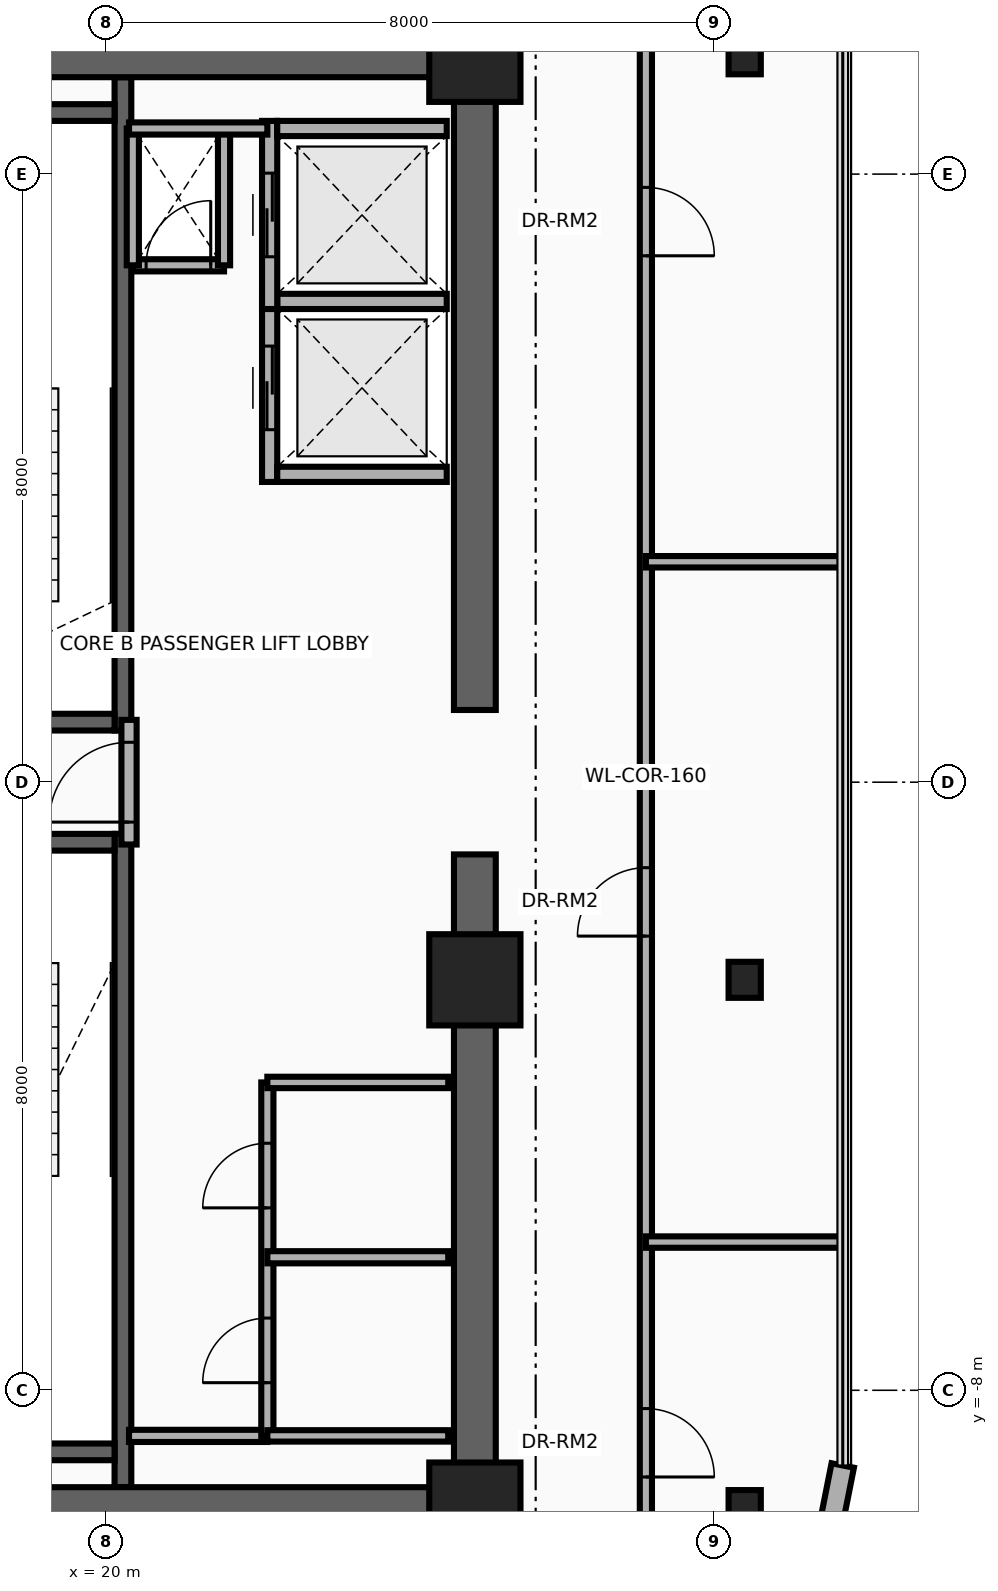
"""IFC4 building model, lengths in metres.
Left out: names, types, materials, properties, quantities, classifications, styles, units other than length and angle.
Written with IfcOpenShell. Run it as: python <this file> out.ifc"""

import sys

from ifc_helpers import new_model, si_unit, direction, frame, frame_2d, origin, origin_2d, place, context, subcontext, project, spatial, rectangle, i_section, extrude, source, transform, mapped, element, fill, save


model = new_model("IFC4")
c1 = context("Model", 3, precision=1e-05, world=origin(), true_north=direction((0.0, 1.0)))
c2 = subcontext(c1, "Body", "Model", "MODEL_VIEW")
j1 = project(units=[si_unit("LENGTHUNIT", "METRE"), si_unit("PLANEANGLEUNIT", "RADIAN")], contexts=[c1])
p1 = place(None, origin())
s1 = spatial("IfcSite", under=j1, at=p1, CompositionType="ELEMENT")
p2 = place(p1, origin())
s2 = spatial("IfcBuilding", under=s1, at=p2, CompositionType="ELEMENT")
p3 = place(p2, frame((0.0, 0.0, 168.6)))
s3 = spatial("IfcBuildingStorey", under=s2, at=p3, CompositionType="ELEMENT", Elevation=168.6)
p4 = place(p3, frame((20.22, 0.68, 0.0), z_axis=(0.0, 0.0, 1.0), x_axis=(0.0, 1.0, 0.0)))
e1 = element("IfcWall", 1, at=p4, inside=s3, PredefinedType="SHEAR", context=c2, shape_type="SweptSolid", body=[
    extrude(rectangle(XDim=8.595, YDim=0.22, at=frame_2d((4.297, 0.0))), origin(), (0.0, 0.0, 1.0), 3.3),
])
p5 = place(p3, frame((17.0, 0.79, 0.0), z_axis=(0.0, 0.0, 1.0), x_axis=(1.0, 0.0, 0.0)))
e2 = element("IfcWall", 2, at=p5, inside=s3, PredefinedType="SHEAR", context=c2, shape_type="SweptSolid", body=[
    extrude(rectangle(XDim=3.11, YDim=0.22, at=frame_2d((1.555, 0.0))), origin(), (0.0, 0.0, 1.0), 3.3),
])
p6 = place(p5, frame((0.95, 0.0, 0.0)))
e3 = element("IfcOpeningElement", 3, at=p6, cuts=e2, PredefinedType="OPENING", context=c2, shape_type="SweptSolid", body=[
    extrude(rectangle(XDim=1.1, YDim=2.15, at=frame_2d((0.55, 1.075))), frame((0.0, 0.125, 0.0), z_axis=(0.0, -1.0, 0.0), x_axis=(1.0, 0.0, 0.0)), (0.0, 0.0, 1.0), 0.25),
])
p7 = place(p3, frame((17.0, 8.81, 0.0), z_axis=(0.0, 0.0, 1.0), x_axis=(1.0, 0.0, 0.0)))
e4 = element("IfcWall", 4, at=p7, inside=s3, PredefinedType="SHEAR", context=c2, shape_type="SweptSolid", body=[
    extrude(rectangle(XDim=3.11, YDim=0.22, at=frame_2d((1.555, 0.0))), origin(), (0.0, 0.0, 1.0), 3.3),
])
p8 = place(p3, frame((20.22, -9.275, 0.0), z_axis=(0.0, 0.0, 1.0), x_axis=(0.0, 1.0, 0.0)))
e5 = element("IfcWall", 5, at=p8, inside=s3, PredefinedType="SHEAR", context=c2, shape_type="SweptSolid", body=[
    extrude(rectangle(XDim=8.595, YDim=0.22, at=frame_2d((4.297, 0.0))), origin(), (0.0, 0.0, 1.0), 3.3),
])
p9 = place(p3, frame((17.0, -8.81, 0.0), z_axis=(0.0, 0.0, 1.0), x_axis=(1.0, 0.0, 0.0)))
e6 = element("IfcWall", 6, at=p9, inside=s3, PredefinedType="SHEAR", context=c2, shape_type="SweptSolid", body=[
    extrude(rectangle(XDim=3.11, YDim=0.22, at=frame_2d((1.555, 0.0))), origin(), (0.0, 0.0, 1.0), 3.3),
])
p10 = place(p3, frame((17.0, -0.79, 0.0), z_axis=(0.0, 0.0, 1.0), x_axis=(1.0, 0.0, 0.0)))
e7 = element("IfcWall", 7, at=p10, inside=s3, PredefinedType="SHEAR", context=c2, shape_type="SweptSolid", body=[
    extrude(rectangle(XDim=3.11, YDim=0.22, at=frame_2d((1.555, 0.0))), origin(), (0.0, 0.0, 1.0), 3.3),
])
p11 = place(p10, frame((0.95, 0.0, 0.0)))
e8 = element("IfcOpeningElement", 8, at=p11, cuts=e7, PredefinedType="OPENING", context=c2, shape_type="SweptSolid", body=[
    extrude(rectangle(XDim=1.1, YDim=2.15, at=frame_2d((0.55, 1.075))), frame((0.0, 0.125, 0.0), z_axis=(0.0, -1.0, 0.0), x_axis=(1.0, 0.0, 0.0)), (0.0, 0.0, 1.0), 0.25),
])
for number, where, z_axis, x_axis in (
    (9, (24.85, -9.825, 0.0), (0.0, 0.0, 1.0), (0.0, 1.0, 0.0)),
    (10, (24.85, 0.95, 0.0), (0.0, 0.0, 1.0), (0.0, 1.0, 0.0)),
):
    element("IfcWall", number, at=place(p3, frame(where, z_axis=z_axis, x_axis=x_axis)), inside=s3, PredefinedType="SHEAR", context=c2, shape_type="SweptSolid", body=[
        extrude(rectangle(XDim=8.875, YDim=0.55, at=frame_2d((4.438, 0.0))), origin(), (0.0, 0.0, 1.0), 3.3),
    ])
for number, where, z_axis, x_axis in (
    (11, (15.85, 9.55, 0.0), (0.0, 0.0, 1.0), (1.0, 0.0, 0.0)),
    (12, (15.85, -9.55, 0.0), (0.0, 0.0, 1.0), (1.0, 0.0, 0.0)),
):
    element("IfcWall", number, at=place(p3, frame(where, z_axis=z_axis, x_axis=x_axis)), inside=s3, PredefinedType="SHEAR", context=c2, shape_type="SweptSolid", body=[
        extrude(rectangle(XDim=9.0, YDim=0.55, at=frame_2d((4.5, 0.0))), origin(), (0.0, 0.0, 1.0), 3.3),
    ])
m1 = source(origin(), c2, "Body", "SweptSolid", [
    extrude(rectangle(XDim=1.2, YDim=1.2, at=origin_2d()), origin(), (0.0, 0.0, 1.0), 3.7),
])
p12 = place(p3, frame((24.85, -9.55, 0.0), z_axis=(0.0, 0.0, 1.0), x_axis=(1.0, 0.0, 0.0)))
e13 = element("IfcColumn", 13, at=p12, inside=s3, PredefinedType="COLUMN", context=c2, shape_type="MappedRepresentation", body=[
    mapped(m1, transform((0.0, 0.0, 0.0), x_axis=(1.0, 0.0, 0.0), y_axis=(0.0, 1.0, 0.0), z_axis=(0.0, 0.0, 1.0), scale=1.0)),
])
m2 = source(origin(), c2, "Body", "SweptSolid", [
    extrude(i_section(OverallWidth=0.424, OverallDepth=0.474, WebThickness=0.048, FlangeThickness=0.077, at=origin_2d()), origin(), (0.0, 0.0, 1.0), 3.7),
])
p13 = place(p3, frame((28.4, -9.55, 0.0), z_axis=(0.0, 0.0, 1.0), x_axis=(1.0, 0.0, 0.0)))
e14 = element("IfcColumn", 14, at=p13, inside=s3, PredefinedType="COLUMN", context=c2, shape_type="MappedRepresentation", body=[
    mapped(m2, transform((0.0, 0.0, 0.0), x_axis=(1.0, 0.0, 0.0), y_axis=(0.0, 1.0, 0.0), z_axis=(0.0, 0.0, 1.0), scale=1.0)),
])
p14 = place(p3, frame((24.85, -2.6, 0.0), z_axis=(0.0, 0.0, 1.0), x_axis=(1.0, 0.0, 0.0)))
e15 = element("IfcColumn", 15, at=p14, inside=s3, PredefinedType="COLUMN", context=c2, shape_type="MappedRepresentation", body=[
    mapped(m1, transform((0.0, 0.0, 0.0), x_axis=(1.0, 0.0, 0.0), y_axis=(0.0, 1.0, 0.0), z_axis=(0.0, 0.0, 1.0), scale=1.0)),
])
p15 = place(p3, frame((28.4, -2.6, 0.0), z_axis=(0.0, 0.0, 1.0), x_axis=(1.0, 0.0, 0.0)))
e16 = element("IfcColumn", 16, at=p15, inside=s3, PredefinedType="COLUMN", context=c2, shape_type="MappedRepresentation", body=[
    mapped(m2, transform((0.0, 0.0, 0.0), x_axis=(1.0, 0.0, 0.0), y_axis=(0.0, 1.0, 0.0), z_axis=(0.0, 0.0, 1.0), scale=1.0)),
])
p16 = place(p3, frame((24.85, 9.55, 0.0), z_axis=(0.0, 0.0, 1.0), x_axis=(1.0, 0.0, 0.0)))
e17 = element("IfcColumn", 17, at=p16, inside=s3, PredefinedType="COLUMN", context=c2, shape_type="MappedRepresentation", body=[
    mapped(m1, transform((0.0, 0.0, 0.0), x_axis=(1.0, 0.0, 0.0), y_axis=(0.0, 1.0, 0.0), z_axis=(0.0, 0.0, 1.0), scale=1.0)),
])
p17 = place(p3, frame((28.4, 9.55, 0.0), z_axis=(0.0, 0.0, 1.0), x_axis=(1.0, 0.0, 0.0)))
e18 = element("IfcColumn", 18, at=p17, inside=s3, PredefinedType="COLUMN", context=c2, shape_type="MappedRepresentation", body=[
    mapped(m2, transform((0.0, 0.0, 0.0), x_axis=(1.0, 0.0, 0.0), y_axis=(0.0, 1.0, 0.0), z_axis=(0.0, 0.0, 1.0), scale=1.0)),
])
p18 = place(p3, frame((29.69, -8.989, 0.0), z_axis=(0.0, 0.0, 1.0), x_axis=(-0.195043173023, -0.980794657743, 0.0)))
e19 = element("IfcWall", 19, at=p18, inside=s3, PredefinedType="SOLIDWALL", context=c2, shape_type="SweptSolid", body=[
    extrude(rectangle(XDim=1.138, YDim=0.3, at=frame_2d((0.569, 0.0))), origin(), (0.0, 0.0, 1.0), 3.3),
])
p19 = place(p3, frame((22.15, 3.95, 0.0), z_axis=(0.0, 0.0, 1.0), x_axis=(0.0, 1.0, 0.0)))
e20 = element("IfcWall", 20, at=p19, inside=s3, PredefinedType="MOVABLE", context=c2, shape_type="SweptSolid", body=[
    extrude(rectangle(XDim=2.475, YDim=0.2, at=frame_2d((1.238, 0.0))), origin(), (0.0, 0.0, 1.0), 3.3),
])
p20 = place(p19, frame((0.688, 0.0, 0.0)))
e21 = element("IfcOpeningElement", 21, at=p20, cuts=e20, PredefinedType="OPENING", context=c2, shape_type="SweptSolid", body=[
    extrude(rectangle(XDim=1.1, YDim=2.1, at=frame_2d((0.55, 1.05))), frame((0.0, 0.115, 0.0), z_axis=(0.0, -1.0, 0.0), x_axis=(1.0, 0.0, 0.0)), (0.0, 0.0, 1.0), 0.23),
])
for number, where, z_axis, x_axis in (
    (22, (22.25, 4.05, 0.0), (0.0, 0.0, 1.0), (1.0, 0.0, 0.0)),
    (23, (22.25, 6.325, 0.0), (0.0, 0.0, 1.0), (1.0, 0.0, 0.0)),
):
    element("IfcWall", number, at=place(p3, frame(where, z_axis=z_axis, x_axis=x_axis)), inside=s3, PredefinedType="MOVABLE", context=c2, shape_type="SweptSolid", body=[
        extrude(rectangle(XDim=2.23, YDim=0.2, at=frame_2d((1.115, 0.0))), origin(), (0.0, 0.0, 1.0), 3.3),
    ])
p21 = place(p3, frame((22.15, 6.225, 0.0), z_axis=(0.0, 0.0, 1.0), x_axis=(0.0, 1.0, 0.0)))
e24 = element("IfcWall", 24, at=p21, inside=s3, PredefinedType="MOVABLE", context=c2, shape_type="SweptSolid", body=[
    extrude(rectangle(XDim=2.475, YDim=0.2, at=frame_2d((1.237, 0.0))), origin(), (0.0, 0.0, 1.0), 3.3),
])
p22 = place(p21, frame((0.688, 0.0, 0.0)))
e25 = element("IfcOpeningElement", 25, at=p22, cuts=e24, PredefinedType="OPENING", context=c2, shape_type="SweptSolid", body=[
    extrude(rectangle(XDim=1.1, YDim=2.1, at=frame_2d((0.55, 1.05))), frame((0.0, 0.115, 0.0), z_axis=(0.0, -1.0, 0.0), x_axis=(1.0, 0.0, 0.0)), (0.0, 0.0, 1.0), 0.23),
])
p23 = place(p3, frame((22.25, 8.6, 0.0), z_axis=(0.0, 0.0, 1.0), x_axis=(1.0, 0.0, 0.0)))
e26 = element("IfcWall", 26, at=p23, inside=s3, PredefinedType="MOVABLE", context=c2, shape_type="SweptSolid", body=[
    extrude(rectangle(XDim=2.23, YDim=0.2, at=frame_2d((1.115, 0.0))), origin(), (0.0, 0.0, 1.0), 3.3),
])
p24 = place(p3, frame((20.3, -0.82, 0.0), z_axis=(0.0, 0.0, 1.0), x_axis=(0.0, 1.0, 0.0)))
e27 = element("IfcWall", 27, at=p24, inside=s3, PredefinedType="PARTITIONING", context=c2, shape_type="SweptSolid", body=[
    extrude(rectangle(XDim=1.64, YDim=0.2, at=frame_2d((0.82, 0.0))), origin(), (0.0, 0.0, 1.0), 3.3),
])
p25 = place(p24, frame((0.295, 0.0, 0.0)))
e28 = element("IfcOpeningElement", 28, at=p25, cuts=e27, PredefinedType="OPENING", context=c2, shape_type="SweptSolid", body=[
    extrude(rectangle(XDim=1.05, YDim=2.15, at=frame_2d((0.525, 1.075))), frame((0.0, 0.115, 0.0), z_axis=(0.0, -1.0, 0.0), x_axis=(1.0, 0.0, 0.0)), (0.0, 0.0, 1.0), 0.23),
])
p26 = place(p3, frame((20.35, 6.8, 0.0), z_axis=(0.0, 0.0, 1.0), x_axis=(1.0, 0.0, 0.0)))
e29 = element("IfcWall", 29, at=p26, inside=s3, PredefinedType="PARTITIONING", context=c2, shape_type="SweptSolid", body=[
    extrude(rectangle(XDim=1.2, YDim=0.16, at=frame_2d((0.6, 0.0))), origin(), (0.0, 0.0, 1.0), 3.3),
])
p27 = place(p26, frame((0.175, 0.0, 0.0)))
e30 = element("IfcOpeningElement", 30, at=p27, cuts=e29, PredefinedType="OPENING", context=c2, shape_type="SweptSolid", body=[
    extrude(rectangle(XDim=0.85, YDim=2.05, at=frame_2d((0.425, 1.025))), frame((0.0, 0.095, 0.0), z_axis=(0.0, -1.0, 0.0), x_axis=(1.0, 0.0, 0.0)), (0.0, 0.0, 1.0), 0.19),
])
for number, where, z_axis, x_axis in (
    (31, (21.55, 6.8, 0.0), (0.0, 0.0, 1.0), (0.0, 1.0, 0.0)),
    (32, (20.35, 6.8, 0.0), (0.0, 0.0, 1.0), (0.0, 1.0, 0.0)),
):
    element("IfcWall", number, at=place(p3, frame(where, z_axis=z_axis, x_axis=x_axis)), inside=s3, PredefinedType="PARTITIONING", context=c2, shape_type="SweptSolid", body=[
        extrude(rectangle(XDim=1.8, YDim=0.16, at=frame_2d((0.9, 0.0))), origin(), (0.0, 0.0, 1.0), 3.3),
    ])
for number, where, z_axis, x_axis in (
    (33, (20.3, -8.6, 0.0), (0.0, 0.0, 1.0), (1.0, 0.0, 0.0)),
    (34, (20.3, 8.6, 0.0), (0.0, 0.0, 1.0), (1.0, 0.0, 0.0)),
):
    element("IfcWall", number, at=place(p3, frame(where, z_axis=z_axis, x_axis=x_axis)), inside=s3, PredefinedType="PARTITIONING", context=c2, shape_type="SweptSolid", body=[
        extrude(rectangle(XDim=1.82, YDim=0.16, at=frame_2d((0.91, 0.0))), origin(), (0.0, 0.0, 1.0), 3.3),
    ])
p28 = place(p3, frame((22.12, -8.6, 0.0), z_axis=(0.0, 0.0, 1.0), x_axis=(0.0, 1.0, 0.0)))
e35 = element("IfcWall", 35, at=p28, inside=s3, PredefinedType="PARTITIONING", context=c2, shape_type="SweptSolid", body=[
    extrude(rectangle(XDim=4.65, YDim=0.16, at=frame_2d((2.325, 0.0))), origin(), (0.0, 0.0, 1.0), 3.3),
])
p29 = place(p28, frame((0.7, 0.0, 0.0)))
e36 = element("IfcOpeningElement", 36, at=p29, cuts=e35, PredefinedType="OPENING", context=c2, shape_type="SweptSolid", body=[
    extrude(rectangle(XDim=0.85, YDim=2.05, at=frame_2d((0.425, 1.025))), frame((0.0, 0.095, 0.0), z_axis=(0.0, -1.0, 0.0), x_axis=(1.0, 0.0, 0.0)), (0.0, 0.0, 1.0), 0.19),
])
p30 = place(p28, frame((3.0, 0.0, 0.0)))
e37 = element("IfcOpeningElement", 37, at=p30, cuts=e35, PredefinedType="OPENING", context=c2, shape_type="SweptSolid", body=[
    extrude(rectangle(XDim=0.85, YDim=2.05, at=frame_2d((0.425, 1.025))), frame((0.0, 0.095, 0.0), z_axis=(0.0, -1.0, 0.0), x_axis=(1.0, 0.0, 0.0)), (0.0, 0.0, 1.0), 0.19),
])
for number, where, z_axis, x_axis in (
    (38, (22.12, -3.95, 0.0), (0.0, 0.0, 1.0), (1.0, 0.0, 0.0)),
    (39, (22.12, -8.6, 0.0), (0.0, 0.0, 1.0), (1.0, 0.0, 0.0)),
):
    element("IfcWall", number, at=place(p3, frame(where, z_axis=z_axis, x_axis=x_axis)), inside=s3, PredefinedType="PARTITIONING", context=c2, shape_type="SweptSolid", body=[
        extrude(rectangle(XDim=2.38, YDim=0.15, at=frame_2d((1.19, 0.0))), origin(), (0.0, 0.0, 1.0), 3.3),
    ])
p31 = place(p3, frame((22.12, -6.25, 0.0), z_axis=(0.0, 0.0, 1.0), x_axis=(1.0, 0.0, 0.0)))
e40 = element("IfcWall", 40, at=p31, inside=s3, PredefinedType="PARTITIONING", context=c2, shape_type="SweptSolid", body=[
    extrude(rectangle(XDim=2.38, YDim=0.16, at=frame_2d((1.19, 0.0))), origin(), (0.0, 0.0, 1.0), 3.3),
])
p32 = place(p3, frame((27.1, -11.701, 0.0), z_axis=(0.0, 0.0, 1.0), x_axis=(0.0, 1.0, 0.0)))
e41 = element("IfcWall", 41, at=p32, inside=s3, PredefinedType="PARTITIONING", context=c2, shape_type="SweptSolid", body=[
    extrude(rectangle(XDim=23.551, YDim=0.16, at=frame_2d((11.775, 0.0))), origin(), (0.0, 0.0, 1.0), 2.085),
])
p33 = place(p32, frame((2.56, 0.0, 0.0)))
e42 = element("IfcOpeningElement", 42, at=p33, cuts=e41, PredefinedType="OPENING", context=c2, shape_type="SweptSolid", body=[
    extrude(rectangle(XDim=0.9, YDim=2.04, at=frame_2d((0.45, 1.02))), frame((0.0, 0.095, 0.0), z_axis=(0.0, -1.0, 0.0), x_axis=(1.0, 0.0, 0.0)), (0.0, 0.0, 1.0), 0.19),
])
p34 = place(p32, frame((9.676, 0.0, 0.0)))
e43 = element("IfcOpeningElement", 43, at=p34, cuts=e41, PredefinedType="OPENING", context=c2, shape_type="SweptSolid", body=[
    extrude(rectangle(XDim=0.9, YDim=2.04, at=frame_2d((0.45, 1.02))), frame((0.0, 0.095, 0.0), z_axis=(0.0, -1.0, 0.0), x_axis=(1.0, 0.0, 0.0)), (0.0, 0.0, 1.0), 0.19),
])
p35 = place(p32, frame((18.626, 0.0, 0.0)))
e44 = element("IfcOpeningElement", 44, at=p35, cuts=e41, PredefinedType="OPENING", context=c2, shape_type="SweptSolid", body=[
    extrude(rectangle(XDim=0.9, YDim=2.04, at=frame_2d((0.45, 1.02))), frame((0.0, 0.095, 0.0), z_axis=(0.0, -1.0, 0.0), x_axis=(1.0, 0.0, 0.0)), (0.0, 0.0, 1.0), 0.19),
])
for number, where, z_axis, x_axis in (
    (45, (27.1, -6.05, 0.0), (0.0, 0.0, 1.0), (1.0, 0.0, 0.0)),
    (46, (27.1, 2.9, 0.0), (0.0, 0.0, 1.0), (1.0, 0.0, 0.0)),
):
    element("IfcWall", number, at=place(p3, frame(where, z_axis=z_axis, x_axis=x_axis)), inside=s3, PredefinedType="PARTITIONING", context=c2, shape_type="SweptSolid", body=[
        extrude(rectangle(XDim=2.59, YDim=0.15, at=frame_2d((1.295, 0.0))), origin(), (0.0, 0.0, 1.0), 2.746),
    ])
p36 = place(p20, origin())
e47 = element("IfcDoor", 47, at=p36, inside=s3, OperationType="DOUBLE_DOOR_SLIDING", PredefinedType="DOOR", context=c2, shape_type="SweptSolid", body=[
    extrude(rectangle(XDim=1.1, YDim=2.1, at=frame_2d((0.55, 1.05))), frame((0.0, 0.025, 0.0), z_axis=(0.0, -1.0, 0.0), x_axis=(1.0, 0.0, 0.0)), (0.0, 0.0, 1.0), 0.05),
])
fill(e21, e47)
p37 = place(p22, origin())
e48 = element("IfcDoor", 48, at=p37, inside=s3, OperationType="DOUBLE_DOOR_SLIDING", PredefinedType="DOOR", context=c2, shape_type="SweptSolid", body=[
    extrude(rectangle(XDim=1.1, YDim=2.1, at=frame_2d((0.55, 1.05))), frame((0.0, 0.025, 0.0), z_axis=(0.0, -1.0, 0.0), x_axis=(1.0, 0.0, 0.0)), (0.0, 0.0, 1.0), 0.05),
])
fill(e25, e48)
p38 = place(p25, origin())
e49 = element("IfcDoor", 49, at=p38, inside=s3, OperationType="SINGLE_SWING_RIGHT", PredefinedType="DOOR", context=c2, shape_type="SweptSolid", body=[
    extrude(rectangle(XDim=1.05, YDim=2.15, at=frame_2d((0.525, 1.075))), frame((0.0, 0.025, 0.0), z_axis=(0.0, -1.0, 0.0), x_axis=(1.0, 0.0, 0.0)), (0.0, 0.0, 1.0), 0.05),
])
fill(e28, e49)
p39 = place(p27, origin())
e50 = element("IfcDoor", 50, at=p39, inside=s3, OperationType="SINGLE_SWING_LEFT", PredefinedType="DOOR", context=c2, shape_type="SweptSolid", body=[
    extrude(rectangle(XDim=0.85, YDim=2.05, at=frame_2d((0.425, 1.025))), frame((0.0, 0.025, 0.0), z_axis=(0.0, -1.0, 0.0), x_axis=(1.0, 0.0, 0.0)), (0.0, 0.0, 1.0), 0.05),
])
fill(e30, e50)
p40 = place(p29, origin())
e51 = element("IfcDoor", 51, at=p40, inside=s3, OperationType="SINGLE_SWING_RIGHT", PredefinedType="DOOR", context=c2, shape_type="SweptSolid", body=[
    extrude(rectangle(XDim=0.85, YDim=2.05, at=frame_2d((0.425, 1.025))), frame((0.0, 0.025, 0.0), z_axis=(0.0, -1.0, 0.0), x_axis=(1.0, 0.0, 0.0)), (0.0, 0.0, 1.0), 0.05),
])
fill(e36, e51)
p41 = place(p30, origin())
e52 = element("IfcDoor", 52, at=p41, inside=s3, OperationType="SINGLE_SWING_LEFT", PredefinedType="DOOR", context=c2, shape_type="SweptSolid", body=[
    extrude(rectangle(XDim=0.85, YDim=2.05, at=frame_2d((0.425, 1.025))), frame((0.0, 0.025, 0.0), z_axis=(0.0, -1.0, 0.0), x_axis=(1.0, 0.0, 0.0)), (0.0, 0.0, 1.0), 0.05),
])
fill(e37, e52)
p42 = place(p33, frame((0.9, 0.0, 0.0), z_axis=(0.0, 0.0, 1.0), x_axis=(-1.0, 0.0, 0.0)))
e53 = element("IfcDoor", 53, at=p42, inside=s3, OperationType="SINGLE_SWING_LEFT", PredefinedType="DOOR", context=c2, shape_type="SweptSolid", body=[
    extrude(rectangle(XDim=0.9, YDim=2.04, at=frame_2d((0.45, 1.02))), frame((0.0, 0.025, 0.0), z_axis=(0.0, -1.0, 0.0), x_axis=(1.0, 0.0, 0.0)), (0.0, 0.0, 1.0), 0.05),
])
fill(e42, e53)
p43 = place(p34, origin())
e54 = element("IfcDoor", 54, at=p43, inside=s3, OperationType="SINGLE_SWING_RIGHT", PredefinedType="DOOR", context=c2, shape_type="SweptSolid", body=[
    extrude(rectangle(XDim=0.9, YDim=2.04, at=frame_2d((0.45, 1.02))), frame((0.0, 0.025, 0.0), z_axis=(0.0, -1.0, 0.0), x_axis=(1.0, 0.0, 0.0)), (0.0, 0.0, 1.0), 0.05),
])
fill(e43, e54)
p44 = place(p35, frame((0.9, 0.0, 0.0), z_axis=(0.0, 0.0, 1.0), x_axis=(-1.0, 0.0, 0.0)))
e55 = element("IfcDoor", 55, at=p44, inside=s3, OperationType="SINGLE_SWING_LEFT", PredefinedType="DOOR", context=c2, shape_type="SweptSolid", body=[
    extrude(rectangle(XDim=0.9, YDim=2.04, at=frame_2d((0.45, 1.02))), frame((0.0, 0.025, 0.0), z_axis=(0.0, -1.0, 0.0), x_axis=(1.0, 0.0, 0.0)), (0.0, 0.0, 1.0), 0.05),
])
fill(e44, e55)
save(model, sys.argv[1])
